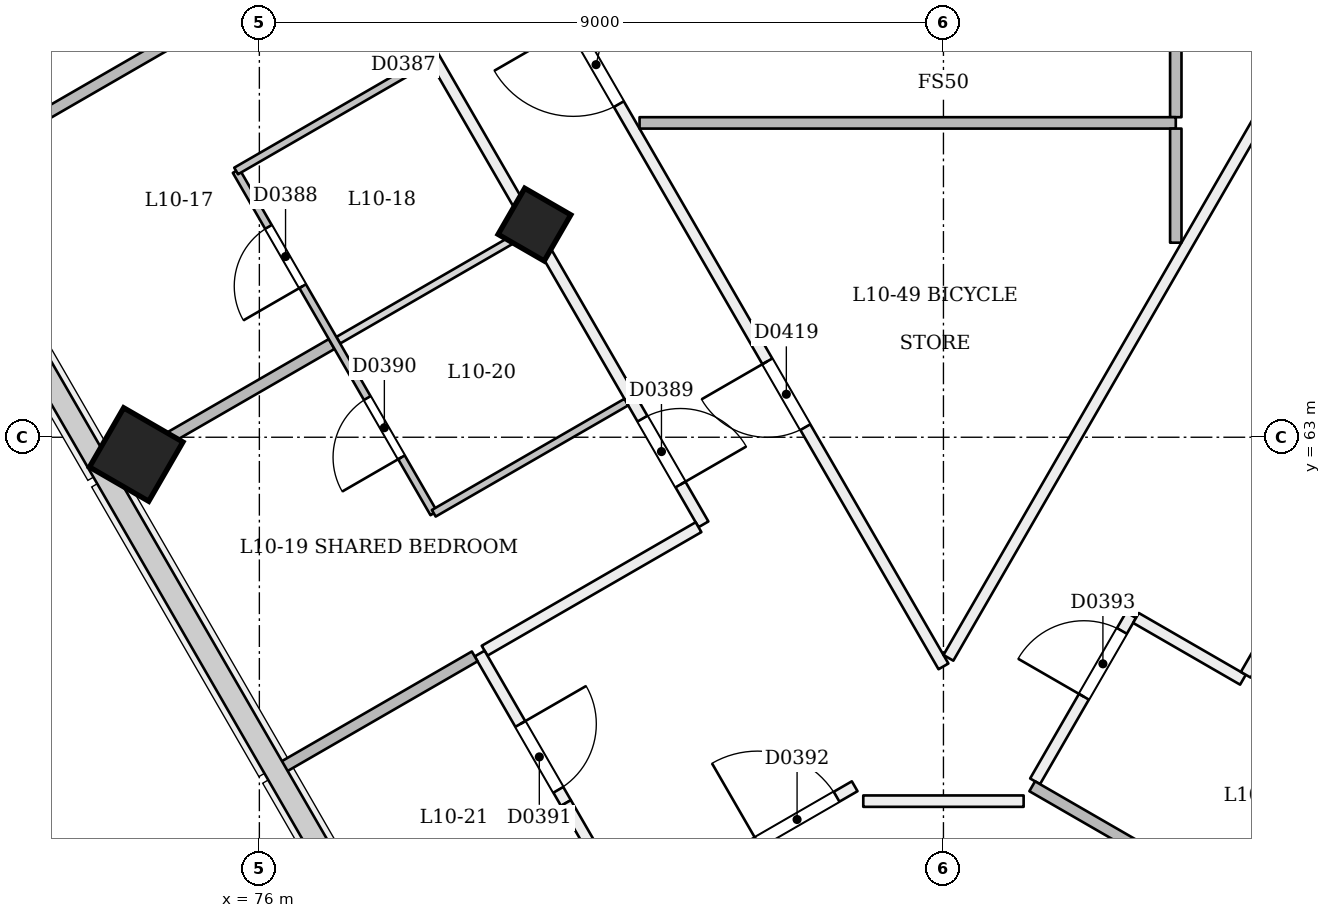
"""IFC4 building model, lengths in metres.
Left out: names, types, materials, properties, quantities, classifications, styles, units other than length and angle.
Written with IfcOpenShell. Run it as: python <this file> out.ifc"""

import sys

from ifc_helpers import new_model, si_unit, direction, frame, frame_2d, origin, origin_2d, place, context, subcontext, project, spatial, rectangle, extrude, element, fill, save


model = new_model("IFC4")
c1 = context("Model", 3, precision=1e-05, world=origin(), true_north=direction((0.0, 1.0)))
c2 = subcontext(c1, "Body", "Model", "MODEL_VIEW")
j1 = project(units=[si_unit("LENGTHUNIT", "METRE"), si_unit("PLANEANGLEUNIT", "RADIAN")], contexts=[c1])
p1 = place(None, origin())
s1 = spatial("IfcSite", under=j1, at=p1, CompositionType="ELEMENT")
p2 = place(p1, origin())
s2 = spatial("IfcBuilding", under=s1, at=p2, CompositionType="ELEMENT")
p3 = place(p2, frame((0.0, 0.0, 45.0)))
s3 = spatial("IfcBuildingStorey", under=s2, at=p3, CompositionType="ELEMENT", Elevation=45.0)
p4 = place(p3, frame((79.592, 65.75, -0.021), z_axis=(0.02222134892, 0.038480872521, 0.999012229206), x_axis=(-0.865637864887, -0.499189496312, 0.038482900691)))
e1 = element("IfcColumn", 1, at=p4, inside=s3, PredefinedType="COLUMN", context=c2, shape_type="SweptSolid", body=[
    extrude(rectangle(XDim=0.7, YDim=0.7, at=origin_2d()), origin(), (0.0, 0.0, 1.0), 3.604),
])
p5 = place(p3, frame((74.353, 62.725, -0.027), z_axis=(0.022221406801, 0.038413224561, 0.999014831351), x_axis=(-0.866019837102, -0.498530447908, 0.038432203346)))
e2 = element("IfcColumn", 2, at=p5, inside=s3, PredefinedType="COLUMN", context=c2, shape_type="SweptSolid", body=[
    extrude(rectangle(XDim=0.9, YDim=0.9, at=origin_2d()), origin(), (0.0, 0.0, 1.0), 3.604),
])
p6 = place(p3, frame((61.853, 96.477, 0.0), z_axis=(0.0, 0.0, 1.0), x_axis=(0.500000327816, -0.86602521452, 0.0)))
e3 = element("IfcWall", 3, at=p6, inside=s3, PredefinedType="PARTITIONING", context=c2, shape_type="SweptSolid", body=[
    extrude(rectangle(XDim=39.979, YDim=0.15, at=frame_2d((19.99, 0.0))), origin(), (0.0, 0.0, 1.0), 2.7),
])
p7 = place(p6, frame((1.49, 0.0, 0.0)))
e4 = element("IfcOpeningElement", 4, at=p7, cuts=e3, PredefinedType="OPENING", context=c2, shape_type="SweptSolid", body=[
    extrude(rectangle(XDim=1.0, YDim=2.1, at=frame_2d((0.5, 1.05))), frame((0.0, 0.085, 0.0), z_axis=(0.0, -1.0, 0.0), x_axis=(1.0, 0.0, 0.0)), (0.0, 0.0, 1.0), 0.171),
])
p8 = place(p6, frame((4.55, 0.0, 0.0)))
e5 = element("IfcOpeningElement", 5, at=p8, cuts=e3, PredefinedType="OPENING", context=c2, shape_type="SweptSolid", body=[
    extrude(rectangle(XDim=1.1, YDim=2.1, at=frame_2d((0.55, 1.05))), frame((0.0, 0.085, 0.0), z_axis=(0.0, -1.0, 0.0), x_axis=(1.0, 0.0, 0.0)), (0.0, 0.0, 1.0), 0.171),
])
p9 = place(p6, frame((11.259, 0.0, 0.0)))
e6 = element("IfcOpeningElement", 6, at=p9, cuts=e3, PredefinedType="OPENING", context=c2, shape_type="SweptSolid", body=[
    extrude(rectangle(XDim=1.0, YDim=2.1, at=frame_2d((0.5, 1.05))), frame((0.0, 0.085, 0.0), z_axis=(0.0, -1.0, 0.0), x_axis=(1.0, 0.0, 0.0)), (0.0, 0.0, 1.0), 0.171),
])
p10 = place(p6, frame((17.979, 0.0, 0.0)))
e7 = element("IfcOpeningElement", 7, at=p10, cuts=e3, PredefinedType="OPENING", context=c2, shape_type="SweptSolid", body=[
    extrude(rectangle(XDim=1.2, YDim=2.1, at=frame_2d((0.6, 1.05))), frame((0.0, 0.085, 0.0), z_axis=(0.0, -1.0, 0.0), x_axis=(1.0, 0.0, 0.0)), (0.0, 0.0, 1.0), 0.171),
])
p11 = place(p6, frame((22.699, 0.0, 0.0)))
e8 = element("IfcOpeningElement", 8, at=p11, cuts=e3, PredefinedType="OPENING", context=c2, shape_type="SweptSolid", body=[
    extrude(rectangle(XDim=1.0, YDim=2.1, at=frame_2d((0.5, 1.05))), frame((0.0, 0.085, 0.0), z_axis=(0.0, -1.0, 0.0), x_axis=(1.0, 0.0, 0.0)), (0.0, 0.0, 1.0), 0.171),
])
p12 = place(p6, frame((29.374, 0.0, 0.0)))
e9 = element("IfcOpeningElement", 9, at=p12, cuts=e3, PredefinedType="OPENING", context=c2, shape_type="SweptSolid", body=[
    extrude(rectangle(XDim=1.0, YDim=2.1, at=frame_2d((0.5, 1.05))), frame((0.0, 0.085, 0.0), z_axis=(0.0, -1.0, 0.0), x_axis=(1.0, 0.0, 0.0)), (0.0, 0.0, 1.0), 0.171),
])
p13 = place(p6, frame((31.584, 0.0, 0.0)))
e10 = element("IfcOpeningElement", 10, at=p13, cuts=e3, PredefinedType="OPENING", context=c2, shape_type="SweptSolid", body=[
    extrude(rectangle(XDim=1.0, YDim=2.1, at=frame_2d((0.5, 1.05))), frame((0.0, 0.085, 0.0), z_axis=(0.0, -1.0, 0.0), x_axis=(1.0, 0.0, 0.0)), (0.0, 0.0, 1.0), 0.171),
])
p14 = place(p6, frame((38.374, 0.0, 0.0)))
e11 = element("IfcOpeningElement", 11, at=p14, cuts=e3, PredefinedType="OPENING", context=c2, shape_type="SweptSolid", body=[
    extrude(rectangle(XDim=1.0, YDim=2.1, at=frame_2d((0.5, 1.05))), frame((0.0, 0.085, 0.0), z_axis=(0.0, -1.0, 0.0), x_axis=(1.0, 0.0, 0.0)), (0.0, 0.0, 1.0), 0.171),
])
p15 = place(p3, frame((81.778, 61.817, 0.0), z_axis=(0.0, 0.0, 1.0), x_axis=(-0.866015446554, -0.500017246033, 0.0)))
e12 = element("IfcWall", 12, at=p15, inside=s3, PredefinedType="PARTITIONING", context=c2, shape_type="SweptSolid", body=[
    extrude(rectangle(XDim=3.25, YDim=0.15, at=frame_2d((1.625, 0.0))), origin(), (0.0, 0.0, 1.0), 3.1),
])
p16 = place(p3, frame((78.898, 60.154, 0.0), z_axis=(0.0, 0.0, 1.0), x_axis=(0.499921036309, -0.866070988693, 0.0)))
e13 = element("IfcWall", 13, at=p16, inside=s3, PredefinedType="PARTITIONING", context=c2, shape_type="SweptSolid", body=[
    extrude(rectangle(XDim=2.27, YDim=0.15, at=frame_2d((1.135, 0.0))), origin(), (0.0, 0.0, 1.0), 3.1),
])
p17 = place(p16, frame((1.07, 0.0, 0.0)))
e14 = element("IfcOpeningElement", 14, at=p17, cuts=e13, PredefinedType="OPENING", context=c2, shape_type="SweptSolid", body=[
    extrude(rectangle(XDim=1.0, YDim=2.1, at=frame_2d((0.5, 1.05))), frame((0.0, 0.085, 0.0), z_axis=(0.0, -1.0, 0.0), x_axis=(1.0, 0.0, 0.0)), (0.0, 0.0, 1.0), 0.171),
])
p18 = place(p3, frame((80.033, 58.188, 0.0), z_axis=(0.0, 0.0, 1.0), x_axis=(0.500093320734, -0.865971518329, 0.0)))
e15 = element("IfcWall", 15, at=p18, inside=s3, PredefinedType="PARTITIONING", context=c2, shape_type="SweptSolid", body=[
    extrude(rectangle(XDim=1.634, YDim=0.15, at=frame_2d((0.817, 0.0))), origin(), (0.0, 0.0, 1.0), 2.6),
])
p19 = place(p3, frame((81.381, 56.993, 0.0), z_axis=(0.0, 0.0, 1.0), x_axis=(0.866004557827, 0.500036104519, 0.0)))
e16 = element("IfcWall", 16, at=p19, inside=s3, PredefinedType="PARTITIONING", context=c2, shape_type="SweptSolid", body=[
    extrude(rectangle(XDim=2.83, YDim=0.15, at=frame_2d((1.415, 0.0))), origin(), (0.0, 0.0, 1.0), 3.1),
])
p20 = place(p19, frame((1.355, 0.0, 0.0)))
e17 = element("IfcOpeningElement", 17, at=p20, cuts=e16, PredefinedType="OPENING", context=c2, shape_type="SweptSolid", body=[
    extrude(rectangle(XDim=1.2, YDim=2.1, at=frame_2d((0.6, 1.05))), frame((0.0, 0.085, 0.0), z_axis=(0.0, -1.0, 0.0), x_axis=(1.0, 0.0, 0.0)), (0.0, 0.0, 1.0), 0.171),
])
p21 = place(p3, frame((83.945, 58.212, 0.0), z_axis=(0.0, 0.0, 1.0), x_axis=(1.0, 0.0, 0.0)))
e18 = element("IfcWall", 18, at=p21, inside=s3, PredefinedType="PARTITIONING", context=c2, shape_type="SweptSolid", body=[
    extrude(rectangle(XDim=2.109, YDim=0.15, at=frame_2d((1.055, 0.0))), origin(), (0.0, 0.0, 1.0), 3.1),
])
p22 = place(p3, frame((86.205, 58.473, 0.0), z_axis=(0.0, 0.0, 1.0), x_axis=(0.500090717682, 0.865973021571, 0.0)))
e19 = element("IfcWall", 19, at=p22, inside=s3, PredefinedType="PARTITIONING", context=c2, shape_type="SweptSolid", body=[
    extrude(rectangle(XDim=2.525, YDim=0.15, at=frame_2d((1.262, 0.0))), origin(), (0.0, 0.0, 1.0), 3.1),
])
p23 = place(p22, frame((1.285, 0.0, 0.0)))
e20 = element("IfcOpeningElement", 20, at=p23, cuts=e19, PredefinedType="OPENING", context=c2, shape_type="SweptSolid", body=[
    extrude(rectangle(XDim=1.0, YDim=2.1, at=frame_2d((0.5, 1.05))), frame((0.0, 0.085, 0.0), z_axis=(0.0, -1.0, 0.0), x_axis=(1.0, 0.0, 0.0)), (0.0, 0.0, 1.0), 0.171),
])
p24 = place(p3, frame((87.533, 60.623, 0.0), z_axis=(0.0, 0.0, 1.0), x_axis=(0.866015446554, -0.500017246033, 0.0)))
e21 = element("IfcWall", 21, at=p24, inside=s3, PredefinedType="PARTITIONING", context=c2, shape_type="SweptSolid", body=[
    extrude(rectangle(XDim=1.625, YDim=0.15, at=frame_2d((0.812, 0.0))), origin(), (0.0, 0.0, 1.0), 3.1),
])
p25 = place(p3, frame((88.978, 59.875, 0.0), z_axis=(0.0, 0.0, 1.0), x_axis=(0.500049196018, 0.865996998587, 0.0)))
e22 = element("IfcWall", 22, at=p25, inside=s3, PredefinedType="PARTITIONING", context=c2, shape_type="SweptSolid", body=[
    extrude(rectangle(XDim=1.229, YDim=0.15, at=frame_2d((0.615, 0.0))), origin(), (0.0, 0.0, 1.0), 3.1),
])
p26 = place(p3, frame((85.0, 59.985, 0.0), z_axis=(0.0, 0.0, 1.0), x_axis=(-0.499997052475, 0.866027105532, 0.0)))
e23 = element("IfcWall", 23, at=p26, inside=s3, PredefinedType="PARTITIONING", context=c2, shape_type="SweptSolid", body=[
    extrude(rectangle(XDim=35.351, YDim=0.15, at=frame_2d((17.675, 0.0))), origin(), (0.0, 0.0, 1.0), 3.1),
])
p27 = place(p26, frame((18.895, 0.0, 0.0)))
e24 = element("IfcOpeningElement", 24, at=p27, cuts=e23, PredefinedType="OPENING", context=c2, shape_type="SweptSolid", body=[
    extrude(rectangle(XDim=1.2, YDim=2.1, at=frame_2d((0.6, 1.05))), frame((0.0, 0.085, 0.0), z_axis=(0.0, -1.0, 0.0), x_axis=(1.0, 0.0, 0.0)), (0.0, 0.0, 1.0), 0.171),
])
p28 = place(p26, frame((24.135, 0.0, 0.0)))
e25 = element("IfcOpeningElement", 25, at=p28, cuts=e23, PredefinedType="OPENING", context=c2, shape_type="SweptSolid", body=[
    extrude(rectangle(XDim=1.2, YDim=2.1, at=frame_2d((0.6, 1.05))), frame((0.0, 0.085, 0.0), z_axis=(0.0, -1.0, 0.0), x_axis=(1.0, 0.0, 0.0)), (0.0, 0.0, 1.0), 0.171),
])
p29 = place(p26, frame((14.175, 0.0, 0.0)))
e26 = element("IfcOpeningElement", 26, at=p29, cuts=e23, PredefinedType="OPENING", context=c2, shape_type="SweptSolid", body=[
    extrude(rectangle(XDim=1.2, YDim=2.1, at=frame_2d((0.6, 1.05))), frame((0.0, 0.085, 0.0), z_axis=(0.0, -1.0, 0.0), x_axis=(1.0, 0.0, 0.0)), (0.0, 0.0, 1.0), 0.171),
])
p30 = place(p26, frame((31.812, 0.0, 0.0)))
e27 = element("IfcOpeningElement", 27, at=p30, cuts=e23, PredefinedType="OPENING", context=c2, shape_type="SweptSolid", body=[
    extrude(rectangle(XDim=1.2, YDim=2.1, at=frame_2d((0.6, 1.05))), frame((0.0, 0.085, 0.0), z_axis=(0.0, -1.0, 0.0), x_axis=(1.0, 0.0, 0.0)), (0.0, 0.0, 1.0), 0.171),
])
p31 = place(p26, frame((8.541, 0.0, 0.0)))
e28 = element("IfcOpeningElement", 28, at=p31, cuts=e23, PredefinedType="OPENING", context=c2, shape_type="SweptSolid", body=[
    extrude(rectangle(XDim=1.2, YDim=2.1, at=frame_2d((0.6, 1.05))), frame((0.0, 0.085, 0.0), z_axis=(0.0, -1.0, 0.0), x_axis=(1.0, 0.0, 0.0)), (0.0, 0.0, 1.0), 0.171),
])
p32 = place(p26, frame((28.206, 0.0, 0.0)))
e29 = element("IfcOpeningElement", 29, at=p32, cuts=e23, PredefinedType="OPENING", context=c2, shape_type="SweptSolid", body=[
    extrude(rectangle(XDim=1.0, YDim=2.1, at=frame_2d((0.5, 1.05))), frame((0.0, 0.085, 0.0), z_axis=(0.0, -1.0, 0.0), x_axis=(1.0, 0.0, 0.0)), (0.0, 0.0, 1.0), 0.171),
])
p33 = place(p26, frame((3.634, 0.0, 0.0)))
e30 = element("IfcOpeningElement", 30, at=p33, cuts=e23, PredefinedType="OPENING", context=c2, shape_type="SweptSolid", body=[
    extrude(rectangle(XDim=1.0, YDim=2.1, at=frame_2d((0.5, 1.05))), frame((0.0, 0.085, 0.0), z_axis=(0.0, -1.0, 0.0), x_axis=(1.0, 0.0, 0.0)), (0.0, 0.0, 1.0), 0.171),
])
p34 = place(p3, frame((102.675, 90.6, 0.0), z_axis=(0.0, 0.0, 1.0), x_axis=(-0.499997865474, -0.86602663615, 0.0)))
e31 = element("IfcWall", 31, at=p34, inside=s3, PredefinedType="PARTITIONING", context=c2, shape_type="SweptSolid", body=[
    extrude(rectangle(XDim=35.221, YDim=0.15, at=frame_2d((17.61, 0.0))), origin(), (0.0, 0.0, 1.0), 3.1),
])
p35 = place(p34, frame((12.875, 0.0, 0.0)))
e32 = element("IfcOpeningElement", 32, at=p35, cuts=e31, PredefinedType="OPENING", context=c2, shape_type="SweptSolid", body=[
    extrude(rectangle(XDim=1.2, YDim=2.1, at=frame_2d((0.6, 1.05))), frame((0.0, 0.085, 0.0), z_axis=(0.0, -1.0, 0.0), x_axis=(1.0, 0.0, 0.0)), (0.0, 0.0, 1.0), 0.171),
])
p36 = place(p34, frame((4.983, 0.0, 0.0)))
e33 = element("IfcOpeningElement", 33, at=p36, cuts=e31, PredefinedType="OPENING", context=c2, shape_type="SweptSolid", body=[
    extrude(rectangle(XDim=1.2, YDim=2.1, at=frame_2d((0.6, 1.05))), frame((0.0, 0.085, 0.0), z_axis=(0.0, -1.0, 0.0), x_axis=(1.0, 0.0, 0.0)), (0.0, 0.0, 1.0), 0.171),
])
p37 = place(p34, frame((21.048, 0.0, 0.0)))
e34 = element("IfcOpeningElement", 34, at=p37, cuts=e31, PredefinedType="OPENING", context=c2, shape_type="SweptSolid", body=[
    extrude(rectangle(XDim=1.0, YDim=2.1, at=frame_2d((0.5, 1.05))), frame((0.0, 0.085, 0.0), z_axis=(0.0, -1.0, 0.0), x_axis=(1.0, 0.0, 0.0)), (0.0, 0.0, 1.0), 0.171),
])
p38 = place(p3, frame((71.782, 66.438, 0.0), z_axis=(0.0, 0.0, 1.0), x_axis=(0.866025401434, 0.500000004071, 0.0)))
e35 = element("IfcWall", 35, at=p38, inside=s3, PredefinedType="PARTITIONING", context=c2, shape_type="SweptSolid", body=[
    extrude(rectangle(XDim=6.345, YDim=0.15, at=frame_2d((3.173, 0.0))), origin(), (0.0, 0.0, 1.0), 2.6),
])
p39 = place(p3, frame((78.294, 62.0, 0.0), z_axis=(0.0, 0.0, 1.0), x_axis=(-0.499971721724, 0.866041729639, 0.0)))
e36 = element("IfcWall", 36, at=p39, inside=s3, PredefinedType="PARTITIONING", context=c2, shape_type="SweptSolid", body=[
    extrude(rectangle(XDim=5.2, YDim=0.1, at=frame_2d((2.6, 0.0))), origin(), (0.0, 0.0, 1.0), 2.7),
])
p40 = place(p39, frame((3.45, 0.0, 0.0)))
e37 = element("IfcOpeningElement", 37, at=p40, cuts=e36, PredefinedType="OPENING", context=c2, shape_type="SweptSolid", body=[
    extrude(rectangle(XDim=0.9, YDim=2.1, at=frame_2d((0.45, 1.05))), frame((0.0, 0.061, 0.0), z_axis=(0.0, -1.0, 0.0), x_axis=(1.0, 0.0, 0.0)), (0.0, 0.0, 1.0), 0.121),
])
p41 = place(p39, frame((0.85, 0.0, 0.0)))
e38 = element("IfcOpeningElement", 38, at=p41, cuts=e36, PredefinedType="OPENING", context=c2, shape_type="SweptSolid", body=[
    extrude(rectangle(XDim=0.9, YDim=2.1, at=frame_2d((0.45, 1.05))), frame((0.0, 0.061, 0.0), z_axis=(0.0, -1.0, 0.0), x_axis=(1.0, 0.0, 0.0)), (0.0, 0.0, 1.0), 0.121),
])
p42 = place(p3, frame((75.695, 66.503, 0.0), z_axis=(0.0, 0.0, 1.0), x_axis=(0.866025730634, 0.499999433879, 0.0)))
e39 = element("IfcWall", 39, at=p42, inside=s3, PredefinedType="PARTITIONING", context=c2, shape_type="SweptSolid", body=[
    extrude(rectangle(XDim=2.925, YDim=0.1, at=frame_2d((1.462, 0.0))), origin(), (0.0, 0.0, 1.0), 3.1),
])
p43 = place(p3, frame((74.05, 62.551, 0.0), z_axis=(0.0, 0.0, 1.0), x_axis=(0.866014461049, 0.500018952895, 0.0)))
e40 = element("IfcWall", 40, at=p43, inside=s3, PredefinedType="PARTITIONING", context=c2, shape_type="SweptSolid", body=[
    extrude(rectangle(XDim=3.35, YDim=0.15, at=frame_2d((1.675, 0.0))), origin(), (0.0, 0.0, 1.0), 2.6),
])
p44 = place(p3, frame((77.038, 64.276, 0.0), z_axis=(0.0, 0.0, 1.0), x_axis=(0.866018712932, 0.500011588718, 0.0)))
e41 = element("IfcWall", 41, at=p44, inside=s3, PredefinedType="PARTITIONING", context=c2, shape_type="SweptSolid", body=[
    extrude(rectangle(XDim=2.875, YDim=0.1, at=frame_2d((1.438, 0.0))), origin(), (0.0, 0.0, 1.0), 2.7),
])
p45 = place(p3, frame((80.828, 63.462, 0.0), z_axis=(0.0, 0.0, 1.0), x_axis=(-0.866046596414, -0.499963291492, 0.0)))
e42 = element("IfcWall", 42, at=p45, inside=s3, PredefinedType="PARTITIONING", context=c2, shape_type="SweptSolid", body=[
    extrude(rectangle(XDim=2.925, YDim=0.1, at=frame_2d((1.462, 0.0))), origin(), (0.0, 0.0, 1.0), 3.1),
])
p46 = place(p3, frame((76.282, 58.644, 0.0), z_axis=(0.0, 0.0, 1.0), x_axis=(0.866066880077, 0.499928154072, 0.0)))
e43 = element("IfcWall", 43, at=p46, inside=s3, PredefinedType="PARTITIONING", context=c2, shape_type="SweptSolid", body=[
    extrude(rectangle(XDim=2.945, YDim=0.15, at=frame_2d((1.473, 0.0))), origin(), (0.0, 0.0, 1.0), 2.6),
])
p47 = place(p3, frame((91.728, 55.198, 0.0), z_axis=(0.0, 0.0, 1.0), x_axis=(-0.866018406147, 0.500012120068, 0.0)))
e44 = element("IfcWall", 44, at=p47, inside=s3, PredefinedType="PARTITIONING", context=c2, shape_type="SweptSolid", body=[
    extrude(rectangle(XDim=6.42, YDim=0.15, at=frame_2d((3.21, 0.0))), origin(), (0.0, 0.0, 1.0), 2.6),
])
p48 = place(p3, frame((88.057, 67.21, 0.0), z_axis=(0.0, 0.0, 1.0), x_axis=(0.0, 1.0, 0.0)))
e45 = element("IfcWall", 45, at=p48, inside=s3, PredefinedType="PARTITIONING", context=c2, shape_type="SweptSolid", body=[
    extrude(rectangle(XDim=4.931, YDim=0.15, at=frame_2d((2.465, 0.0))), origin(), (0.0, 0.0, 1.0), 3.1),
])
p49 = place(p3, frame((81.002, 67.135, 0.0), z_axis=(0.0, 0.0, 1.0), x_axis=(1.0, 0.0, 0.0)))
e46 = element("IfcWall", 46, at=p49, inside=s3, PredefinedType="PARTITIONING", context=c2, shape_type="SweptSolid", body=[
    extrude(rectangle(XDim=7.055, YDim=0.15, at=frame_2d((3.527, 0.0))), origin(), (0.0, 0.0, 1.0), 3.1),
])
p50 = place(p3, frame((88.057, 67.061, 0.0), z_axis=(0.0, 0.0, 1.0), x_axis=(0.0, -1.0, 0.0)))
e47 = element("IfcWall", 47, at=p50, inside=s3, PredefinedType="PARTITIONING", context=c2, shape_type="SweptSolid", body=[
    extrude(rectangle(XDim=1.501, YDim=0.15, at=frame_2d((0.75, 0.0))), origin(), (0.0, 0.0, 1.0), 3.1),
])
p51 = place(p40, origin())
e48 = element("IfcDoor", 48, at=p51, inside=s3, OperationType="SINGLE_SWING_LEFT", PredefinedType="NOTDEFINED", context=c2, shape_type="SweptSolid", body=[
    extrude(rectangle(XDim=0.9, YDim=2.1, at=frame_2d((0.45, 1.05))), frame((0.0, 0.025, 0.0), z_axis=(0.0, -1.0, 0.0), x_axis=(1.0, 0.0, 0.0)), (0.0, 0.0, 1.0), 0.05),
])
fill(e37, e48)
p52 = place(p14, origin())
e49 = element("IfcDoor", 49, at=p52, inside=s3, OperationType="SINGLE_SWING_RIGHT", PredefinedType="NOTDEFINED", context=c2, shape_type="SweptSolid", body=[
    extrude(rectangle(XDim=1.0, YDim=2.1, at=frame_2d((0.5, 1.05))), frame((0.0, 0.025, 0.0), z_axis=(0.0, -1.0, 0.0), x_axis=(1.0, 0.0, 0.0)), (0.0, 0.0, 1.0), 0.05),
])
fill(e11, e49)
p53 = place(p41, origin())
e50 = element("IfcDoor", 50, at=p53, inside=s3, OperationType="SINGLE_SWING_LEFT", PredefinedType="NOTDEFINED", context=c2, shape_type="SweptSolid", body=[
    extrude(rectangle(XDim=0.9, YDim=2.1, at=frame_2d((0.45, 1.05))), frame((0.0, 0.025, 0.0), z_axis=(0.0, -1.0, 0.0), x_axis=(1.0, 0.0, 0.0)), (0.0, 0.0, 1.0), 0.05),
])
fill(e38, e50)
p54 = place(p17, origin())
e51 = element("IfcDoor", 51, at=p54, inside=s3, OperationType="SINGLE_SWING_LEFT", PredefinedType="NOTDEFINED", context=c2, shape_type="SweptSolid", body=[
    extrude(rectangle(XDim=1.0, YDim=2.1, at=frame_2d((0.5, 1.05))), frame((0.0, 0.025, 0.0), z_axis=(0.0, -1.0, 0.0), x_axis=(1.0, 0.0, 0.0)), (0.0, 0.0, 1.0), 0.05),
])
fill(e14, e51)
p55 = place(p20, origin())
e52 = element("IfcDoor", 52, at=p55, inside=s3, OperationType="SINGLE_SWING_LEFT", PredefinedType="NOTDEFINED", context=c2, shape_type="SweptSolid", body=[
    extrude(rectangle(XDim=1.2, YDim=2.1, at=frame_2d((0.6, 1.05))), frame((0.0, 0.025, 0.0), z_axis=(0.0, -1.0, 0.0), x_axis=(1.0, 0.0, 0.0)), (0.0, 0.0, 1.0), 0.05),
])
fill(e17, e52)
p56 = place(p23, origin())
e53 = element("IfcDoor", 53, at=p56, inside=s3, OperationType="SINGLE_SWING_LEFT", PredefinedType="NOTDEFINED", context=c2, shape_type="SweptSolid", body=[
    extrude(rectangle(XDim=1.0, YDim=2.1, at=frame_2d((0.5, 1.05))), frame((0.0, 0.025, 0.0), z_axis=(0.0, -1.0, 0.0), x_axis=(1.0, 0.0, 0.0)), (0.0, 0.0, 1.0), 0.05),
])
fill(e20, e53)
p57 = place(p31, origin())
e54 = element("IfcDoor", 54, at=p57, inside=s3, OperationType="SINGLE_SWING_RIGHT", PredefinedType="NOTDEFINED", context=c2, shape_type="SweptSolid", body=[
    extrude(rectangle(XDim=1.2, YDim=2.1, at=frame_2d((0.6, 1.05))), frame((0.0, 0.025, 0.0), z_axis=(0.0, -1.0, 0.0), x_axis=(1.0, 0.0, 0.0)), (0.0, 0.0, 1.0), 0.05),
])
fill(e28, e54)
p58 = place(p33, origin())
e55 = element("IfcDoor", 55, at=p58, inside=s3, OperationType="SINGLE_SWING_RIGHT", PredefinedType="NOTDEFINED", context=c2, shape_type="SweptSolid", body=[
    extrude(rectangle(XDim=1.0, YDim=2.1, at=frame_2d((0.5, 1.05))), frame((0.0, 0.025, 0.0), z_axis=(0.0, -1.0, 0.0), x_axis=(1.0, 0.0, 0.0)), (0.0, 0.0, 1.0), 0.05),
])
fill(e30, e55)
save(model, sys.argv[1])
